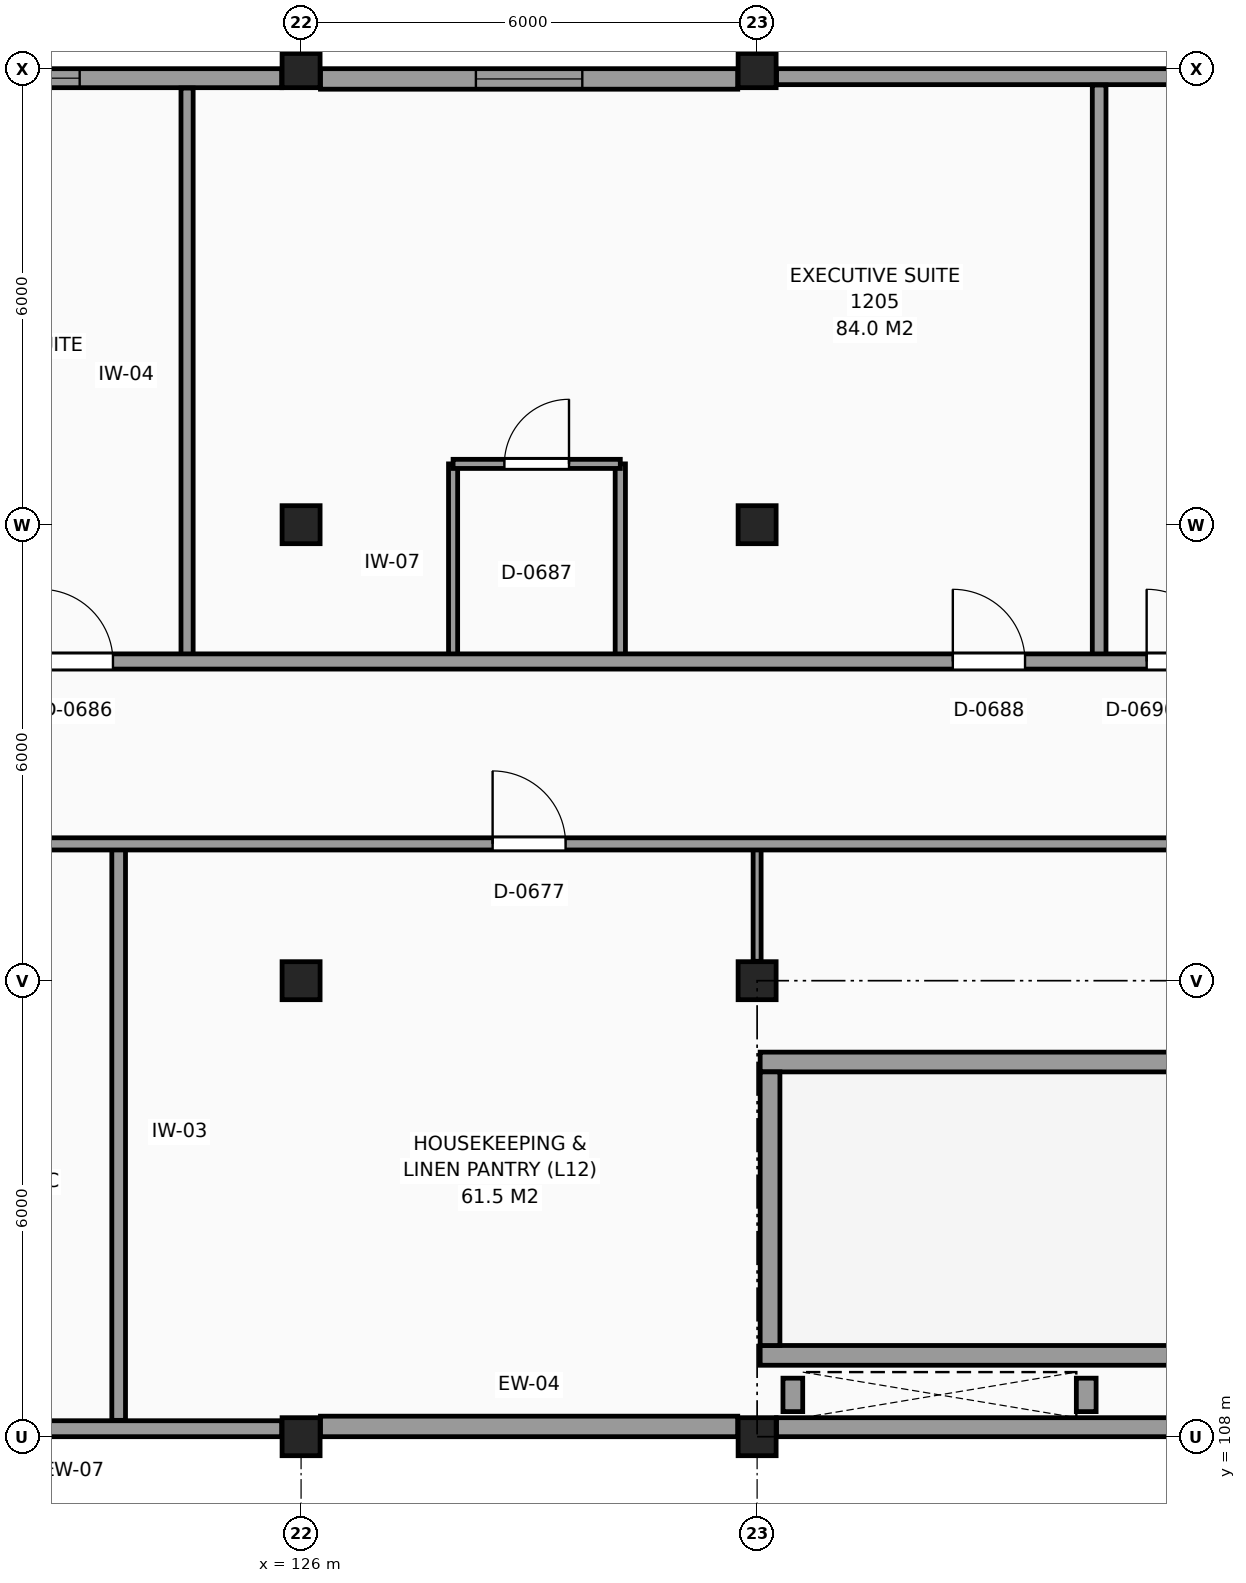
"""IFC4 building model, lengths in metres.
Left out: names, types, materials, properties, quantities, classifications, styles, units other than length and angle.
Written with IfcOpenShell. Run it as: python <this file> out.ifc"""

import sys

from ifc_helpers import new_model, si_unit, direction, frame, frame_2d, origin, origin_2d, place, context, subcontext, project, spatial, rectangle, extrude, element, fill, save


model = new_model("IFC4")
c1 = context("Model", 3, precision=1e-05, world=origin(), true_north=direction((0.0, 1.0)))
c2 = subcontext(c1, "Body", "Model", "MODEL_VIEW")
j1 = project(units=[si_unit("LENGTHUNIT", "METRE"), si_unit("PLANEANGLEUNIT", "RADIAN")], contexts=[c1])
p1 = place(None, origin())
s1 = spatial("IfcSite", under=j1, at=p1, CompositionType="ELEMENT")
p2 = place(p1, origin())
s2 = spatial("IfcBuilding", under=s1, at=p2, CompositionType="ELEMENT")
p3 = place(p2, frame((0.0, 0.0, 48.0)))
s3 = spatial("IfcBuildingStorey", under=s2, at=p3, CompositionType="ELEMENT", Elevation=48.0)
for number, where, z_axis, x_axis in (
    (1, (126.0, 108.0, 0.0), (0.0, 0.0, 1.0), (1.0, 0.0, 0.0)),
    (2, (126.0, 114.0, 0.0), (0.0, 0.0, 1.0), (1.0, 0.0, 0.0)),
    (3, (126.0, 120.0, 0.0), (0.0, 0.0, 1.0), (1.0, 0.0, 0.0)),
    (4, (126.0, 126.0, 0.0), (0.0, 0.0, 1.0), (1.0, 0.0, 0.0)),
    (5, (132.0, 108.0, 0.0), (0.0, 0.0, 1.0), (1.0, 0.0, 0.0)),
    (6, (132.0, 114.0, 0.0), (0.0, 0.0, 1.0), (1.0, 0.0, 0.0)),
    (7, (132.0, 120.0, 0.0), (0.0, 0.0, 1.0), (1.0, 0.0, 0.0)),
    (8, (132.0, 126.0, 0.0), (0.0, 0.0, 1.0), (1.0, 0.0, 0.0)),
):
    element("IfcColumn", number, at=place(p3, frame(where, z_axis=z_axis, x_axis=x_axis)), inside=s3, PredefinedType="COLUMN", context=c2, shape_type="SweptSolid", body=[
        extrude(rectangle(XDim=0.5, YDim=0.5, at=origin_2d()), origin(), (0.0, 0.0, 1.0), 3.3),
    ])
p4 = place(p3, frame((137.745, 125.895, 0.0), z_axis=(0.0, 0.0, 1.0), x_axis=(-1.0, 0.0, 0.0)))
e9 = element("IfcWall", 9, at=p4, inside=s3, PredefinedType="SOLIDWALL", context=c2, shape_type="SweptSolid", body=[
    extrude(rectangle(XDim=5.49, YDim=0.21, at=frame_2d((2.745, 0.0))), origin(), (0.0, 0.0, 1.0), 2.4),
])
p5 = place(p3, frame((131.745, 125.865, 0.0), z_axis=(0.0, 0.0, 1.0), x_axis=(-1.0, 0.0, 0.0)))
e10 = element("IfcWall", 10, at=p5, inside=s3, PredefinedType="SOLIDWALL", context=c2, shape_type="SweptSolid", body=[
    extrude(rectangle(XDim=5.49, YDim=0.27, at=frame_2d((2.745, 0.0))), origin(), (0.0, 0.0, 1.0), 2.4),
])
p6 = place(p5, frame((2.045, 0.0, 0.8)))
e11 = element("IfcOpeningElement", 11, at=p6, cuts=e10, PredefinedType="OPENING", context=c2, shape_type="SweptSolid", body=[
    extrude(rectangle(XDim=1.4, YDim=1.4, at=frame_2d((0.7, 0.7))), frame((0.0, 0.145, 0.0), z_axis=(0.0, -1.0, 0.0), x_axis=(1.0, 0.0, 0.0)), (0.0, 0.0, 1.0), 0.29),
])
p7 = place(p3, frame((125.745, 125.875, 0.0), z_axis=(0.0, 0.0, 1.0), x_axis=(-1.0, 0.0, 0.0)))
e12 = element("IfcWall", 12, at=p7, inside=s3, PredefinedType="SOLIDWALL", context=c2, shape_type="SweptSolid", body=[
    extrude(rectangle(XDim=5.49, YDim=0.25, at=frame_2d((2.745, 0.0))), origin(), (0.0, 0.0, 1.0), 2.4),
])
p8 = place(p7, frame((2.658, 0.0, 0.8)))
e13 = element("IfcOpeningElement", 13, at=p8, cuts=e12, PredefinedType="OPENING", context=c2, shape_type="SweptSolid", body=[
    extrude(rectangle(XDim=1.4, YDim=1.4, at=frame_2d((0.7, 0.7))), frame((0.0, 0.135, 0.0), z_axis=(0.0, -1.0, 0.0), x_axis=(1.0, 0.0, 0.0)), (0.0, 0.0, 1.0), 0.27),
])
p9 = place(p3, frame((120.255, 108.105, 0.0), z_axis=(0.0, 0.0, 1.0), x_axis=(1.0, 0.0, 0.0)))
e14 = element("IfcWall", 14, at=p9, inside=s3, PredefinedType="SOLIDWALL", context=c2, shape_type="SweptSolid", body=[
    extrude(rectangle(XDim=5.49, YDim=0.21, at=frame_2d((2.745, 0.0))), origin(), (0.0, 0.0, 1.0), 2.4),
])
p10 = place(p3, frame((126.255, 108.135, 0.0), z_axis=(0.0, 0.0, 1.0), x_axis=(1.0, 0.0, 0.0)))
e15 = element("IfcWall", 15, at=p10, inside=s3, PredefinedType="SOLIDWALL", context=c2, shape_type="SweptSolid", body=[
    extrude(rectangle(XDim=5.49, YDim=0.27, at=frame_2d((2.745, 0.0))), origin(), (0.0, 0.0, 1.0), 2.4),
])
p11 = place(p3, frame((132.255, 108.125, 0.0), z_axis=(0.0, 0.0, 1.0), x_axis=(1.0, 0.0, 0.0)))
e16 = element("IfcWall", 16, at=p11, inside=s3, PredefinedType="SOLIDWALL", context=c2, shape_type="SweptSolid", body=[
    extrude(rectangle(XDim=5.49, YDim=0.25, at=frame_2d((2.745, 0.0))), origin(), (0.0, 0.0, 1.0), 3.05),
])
for number, where, z_axis, x_axis in (
    (17, (132.04, 109.07, 0.0), (0.0, 0.0, 1.0), (1.0, 0.0, 0.0)),
    (18, (132.04, 112.93, 0.0), (0.0, 0.0, 1.0), (1.0, 0.0, 0.0)),
):
    element("IfcWall", number, at=place(p3, frame(where, z_axis=z_axis, x_axis=x_axis)), inside=s3, PredefinedType="SHEAR", context=c2, shape_type="SweptSolid", body=[
        extrude(rectangle(XDim=10.72, YDim=0.26, at=frame_2d((5.36, 0.0))), origin(), (0.0, 0.0, 1.0), 3.3),
    ])
p12 = place(p3, frame((132.17, 109.2, 0.0), z_axis=(0.0, 0.0, 1.0), x_axis=(0.0, 1.0, 0.0)))
e19 = element("IfcWall", 19, at=p12, inside=s3, PredefinedType="SHEAR", context=c2, shape_type="SweptSolid", body=[
    extrude(rectangle(XDim=3.6, YDim=0.26, at=frame_2d((1.8, 0.0))), origin(), (0.0, 0.0, 1.0), 3.3),
])
for number, where, z_axis, x_axis in (
    (20, (132.47, 108.33, 0.0), (0.0, 0.0, 1.0), (0.0, 1.0, 0.0)),
    (21, (136.33, 108.33, 0.0), (0.0, 0.0, 1.0), (0.0, 1.0, 0.0)),
):
    element("IfcWall", number, at=place(p3, frame(where, z_axis=z_axis, x_axis=x_axis)), inside=s3, PredefinedType="SHEAR", context=c2, shape_type="SweptSolid", body=[
        extrude(rectangle(XDim=0.44, YDim=0.26, at=frame_2d((0.22, 0.0))), origin(), (0.0, 0.0, 1.0), 3.3),
    ])
p13 = place(p3, frame((123.6, 108.215, 0.0), z_axis=(0.0, 0.0, 1.0), x_axis=(0.0, 1.0, 0.0)))
e22 = element("IfcWall", 22, at=p13, inside=s3, PredefinedType="PARTITIONING", context=c2, shape_type="SweptSolid", body=[
    extrude(rectangle(XDim=7.585, YDim=0.18, at=frame_2d((3.792, 0.0))), origin(), (0.0, 0.0, 1.0), 3.05),
])
p14 = place(p3, frame((124.5, 118.2, 0.0), z_axis=(0.0, 0.0, 1.0), x_axis=(0.0, 1.0, 0.0)))
e23 = element("IfcWall", 23, at=p14, inside=s3, PredefinedType="PARTITIONING", context=c2, shape_type="SweptSolid", body=[
    extrude(rectangle(XDim=7.545, YDim=0.16, at=frame_2d((3.772, 0.0))), origin(), (0.0, 0.0, 1.0), 3.05),
])
p15 = place(p3, frame((128.0, 118.2, 0.0), z_axis=(0.0, 0.0, 1.0), x_axis=(0.0, 1.0, 0.0)))
e24 = element("IfcWall", 24, at=p15, inside=s3, PredefinedType="PARTITIONING", context=c2, shape_type="SweptSolid", body=[
    extrude(rectangle(XDim=2.6, YDim=0.12, at=frame_2d((1.3, 0.0))), origin(), (0.0, 0.0, 1.0), 3.05),
])
p16 = place(p3, frame((130.2, 118.2, 0.0), z_axis=(0.0, 0.0, 1.0), x_axis=(0.0, 1.0, 0.0)))
e25 = element("IfcWall", 25, at=p16, inside=s3, PredefinedType="PARTITIONING", context=c2, shape_type="SweptSolid", body=[
    extrude(rectangle(XDim=2.6, YDim=0.135, at=frame_2d((1.3, 0.0))), origin(), (0.0, 0.0, 1.0), 3.05),
])
p17 = place(p3, frame((132.0, 114.255, 0.0), z_axis=(0.0, 0.0, 1.0), x_axis=(0.0, 1.0, 0.0)))
e26 = element("IfcWall", 26, at=p17, inside=s3, PredefinedType="PARTITIONING", context=c2, shape_type="SweptSolid", body=[
    extrude(rectangle(XDim=1.545, YDim=0.105, at=frame_2d((0.772, 0.0))), origin(), (0.0, 0.0, 1.0), 2.25),
])
p18 = place(p3, frame((136.5, 118.2, 0.0), z_axis=(0.0, 0.0, 1.0), x_axis=(0.0, 1.0, 0.0)))
e27 = element("IfcWall", 27, at=p18, inside=s3, PredefinedType="PARTITIONING", context=c2, shape_type="SweptSolid", body=[
    extrude(rectangle(XDim=7.585, YDim=0.18, at=frame_2d((3.792, 0.0))), origin(), (0.0, 0.0, 1.0), 3.05),
])
p19 = place(p3, frame((102.235, 115.8, 0.0), z_axis=(0.0, 0.0, 1.0), x_axis=(1.0, 0.0, 0.0)))
e28 = element("IfcWall", 28, at=p19, inside=s3, PredefinedType="PARTITIONING", context=c2, shape_type="SweptSolid", body=[
    extrude(rectangle(XDim=67.565, YDim=0.16, at=frame_2d((33.782, 0.0))), origin(), (0.0, 0.0, 1.0), 3.05),
])
p20 = place(p19, frame((44.165, 0.0, 0.0)))
e29 = element("IfcOpeningElement", 29, at=p20, cuts=e28, PredefinedType="OPENING", context=c2, shape_type="SweptSolid", body=[
    extrude(rectangle(XDim=1.2, YDim=2.2, at=frame_2d((0.6, 1.1))), frame((0.0, 0.09, 0.0), z_axis=(0.0, -1.0, 0.0), x_axis=(1.0, 0.0, 0.0)), (0.0, 0.0, 1.0), 0.18),
])
p21 = place(p19, frame((14.165, 0.0, 0.0)))
e30 = element("IfcOpeningElement", 30, at=p21, cuts=e28, PredefinedType="OPENING", context=c2, shape_type="SweptSolid", body=[
    extrude(rectangle(XDim=1.2, YDim=2.2, at=frame_2d((0.6, 1.1))), frame((0.0, 0.09, 0.0), z_axis=(0.0, -1.0, 0.0), x_axis=(1.0, 0.0, 0.0)), (0.0, 0.0, 1.0), 0.18),
])
p22 = place(p19, frame((19.315, 0.0, 0.0)))
e31 = element("IfcOpeningElement", 31, at=p22, cuts=e28, PredefinedType="OPENING", context=c2, shape_type="SweptSolid", body=[
    extrude(rectangle(XDim=1.0, YDim=2.15, at=frame_2d((0.5, 1.075))), frame((0.0, 0.09, 0.0), z_axis=(0.0, -1.0, 0.0), x_axis=(1.0, 0.0, 0.0)), (0.0, 0.0, 1.0), 0.18),
])
p23 = place(p19, frame((26.285, 0.0, 0.0)))
e32 = element("IfcOpeningElement", 32, at=p23, cuts=e28, PredefinedType="OPENING", context=c2, shape_type="SweptSolid", body=[
    extrude(rectangle(XDim=0.96, YDim=2.15, at=frame_2d((0.48, 1.075))), frame((0.0, 0.09, 0.0), z_axis=(0.0, -1.0, 0.0), x_axis=(1.0, 0.0, 0.0)), (0.0, 0.0, 1.0), 0.18),
])
p24 = place(p19, frame((49.965, 0.0, 0.0)))
e33 = element("IfcOpeningElement", 33, at=p24, cuts=e28, PredefinedType="OPENING", context=c2, shape_type="SweptSolid", body=[
    extrude(rectangle(XDim=1.6, YDim=2.25, at=frame_2d((0.8, 1.125))), frame((0.0, 0.09, 0.0), z_axis=(0.0, -1.0, 0.0), x_axis=(1.0, 0.0, 0.0)), (0.0, 0.0, 1.0), 0.18),
])
p25 = place(p3, frame((102.235, 118.2, 0.0), z_axis=(0.0, 0.0, 1.0), x_axis=(1.0, 0.0, 0.0)))
e34 = element("IfcWall", 34, at=p25, inside=s3, PredefinedType="PARTITIONING", context=c2, shape_type="SweptSolid", body=[
    extrude(rectangle(XDim=74.265, YDim=0.2, at=frame_2d((37.132, 0.0))), origin(), (0.0, 0.0, 1.0), 3.05),
])
p26 = place(p25, frame((0.49, 0.0, 0.0)))
e35 = element("IfcOpeningElement", 35, at=p26, cuts=e34, PredefinedType="OPENING", context=c2, shape_type="SweptSolid", body=[
    extrude(rectangle(XDim=0.95, YDim=2.1, at=frame_2d((0.475, 1.05))), frame((0.0, 0.11, 0.0), z_axis=(0.0, -1.0, 0.0), x_axis=(1.0, 0.0, 0.0)), (0.0, 0.0, 1.0), 0.22),
])
p27 = place(p25, frame((4.89, 0.0, 0.0)))
e36 = element("IfcOpeningElement", 36, at=p27, cuts=e34, PredefinedType="OPENING", context=c2, shape_type="SweptSolid", body=[
    extrude(rectangle(XDim=0.95, YDim=2.1, at=frame_2d((0.475, 1.05))), frame((0.0, 0.11, 0.0), z_axis=(0.0, -1.0, 0.0), x_axis=(1.0, 0.0, 0.0)), (0.0, 0.0, 1.0), 0.22),
])
p28 = place(p25, frame((12.09, 0.0, 0.0)))
e37 = element("IfcOpeningElement", 37, at=p28, cuts=e34, PredefinedType="OPENING", context=c2, shape_type="SweptSolid", body=[
    extrude(rectangle(XDim=0.95, YDim=2.1, at=frame_2d((0.475, 1.05))), frame((0.0, 0.11, 0.0), z_axis=(0.0, -1.0, 0.0), x_axis=(1.0, 0.0, 0.0)), (0.0, 0.0, 1.0), 0.22),
])
p29 = place(p25, frame((20.34, 0.0, 0.0)))
e38 = element("IfcOpeningElement", 38, at=p29, cuts=e34, PredefinedType="OPENING", context=c2, shape_type="SweptSolid", body=[
    extrude(rectangle(XDim=0.95, YDim=2.1, at=frame_2d((0.475, 1.05))), frame((0.0, 0.11, 0.0), z_axis=(0.0, -1.0, 0.0), x_axis=(1.0, 0.0, 0.0)), (0.0, 0.0, 1.0), 0.22),
])
p30 = place(p25, frame((32.34, 0.0, 0.0)))
e39 = element("IfcOpeningElement", 39, at=p30, cuts=e34, PredefinedType="OPENING", context=c2, shape_type="SweptSolid", body=[
    extrude(rectangle(XDim=0.95, YDim=2.1, at=frame_2d((0.475, 1.05))), frame((0.0, 0.11, 0.0), z_axis=(0.0, -1.0, 0.0), x_axis=(1.0, 0.0, 0.0)), (0.0, 0.0, 1.0), 0.22),
])
p31 = place(p25, frame((34.89, 0.0, 0.0)))
e40 = element("IfcOpeningElement", 40, at=p31, cuts=e34, PredefinedType="OPENING", context=c2, shape_type="SweptSolid", body=[
    extrude(rectangle(XDim=0.95, YDim=2.1, at=frame_2d((0.475, 1.05))), frame((0.0, 0.11, 0.0), z_axis=(0.0, -1.0, 0.0), x_axis=(1.0, 0.0, 0.0)), (0.0, 0.0, 1.0), 0.22),
])
p32 = place(p25, frame((42.09, 0.0, 0.0)))
e41 = element("IfcOpeningElement", 41, at=p32, cuts=e34, PredefinedType="OPENING", context=c2, shape_type="SweptSolid", body=[
    extrude(rectangle(XDim=0.95, YDim=2.1, at=frame_2d((0.475, 1.05))), frame((0.0, 0.11, 0.0), z_axis=(0.0, -1.0, 0.0), x_axis=(1.0, 0.0, 0.0)), (0.0, 0.0, 1.0), 0.22),
])
p33 = place(p25, frame((46.29, 0.0, 0.0)))
e42 = element("IfcOpeningElement", 42, at=p33, cuts=e34, PredefinedType="OPENING", context=c2, shape_type="SweptSolid", body=[
    extrude(rectangle(XDim=0.95, YDim=2.1, at=frame_2d((0.475, 1.05))), frame((0.0, 0.11, 0.0), z_axis=(0.0, -1.0, 0.0), x_axis=(1.0, 0.0, 0.0)), (0.0, 0.0, 1.0), 0.22),
])
p34 = place(p25, frame((55.59, 0.0, 0.0)))
e43 = element("IfcOpeningElement", 43, at=p34, cuts=e34, PredefinedType="OPENING", context=c2, shape_type="SweptSolid", body=[
    extrude(rectangle(XDim=0.95, YDim=2.1, at=frame_2d((0.475, 1.05))), frame((0.0, 0.11, 0.0), z_axis=(0.0, -1.0, 0.0), x_axis=(1.0, 0.0, 0.0)), (0.0, 0.0, 1.0), 0.22),
])
p35 = place(p25, frame((60.09, 0.0, 0.0)))
e44 = element("IfcOpeningElement", 44, at=p35, cuts=e34, PredefinedType="OPENING", context=c2, shape_type="SweptSolid", body=[
    extrude(rectangle(XDim=0.95, YDim=2.1, at=frame_2d((0.475, 1.05))), frame((0.0, 0.11, 0.0), z_axis=(0.0, -1.0, 0.0), x_axis=(1.0, 0.0, 0.0)), (0.0, 0.0, 1.0), 0.22),
])
p36 = place(p25, frame((64.29, 0.0, 0.0)))
e45 = element("IfcOpeningElement", 45, at=p36, cuts=e34, PredefinedType="OPENING", context=c2, shape_type="SweptSolid", body=[
    extrude(rectangle(XDim=0.95, YDim=2.1, at=frame_2d((0.475, 1.05))), frame((0.0, 0.11, 0.0), z_axis=(0.0, -1.0, 0.0), x_axis=(1.0, 0.0, 0.0)), (0.0, 0.0, 1.0), 0.22),
])
p37 = place(p25, frame((68.24, 0.0, 0.0)))
e46 = element("IfcOpeningElement", 46, at=p37, cuts=e34, PredefinedType="OPENING", context=c2, shape_type="SweptSolid", body=[
    extrude(rectangle(XDim=0.95, YDim=2.1, at=frame_2d((0.475, 1.05))), frame((0.0, 0.11, 0.0), z_axis=(0.0, -1.0, 0.0), x_axis=(1.0, 0.0, 0.0)), (0.0, 0.0, 1.0), 0.22),
])
p38 = place(p3, frame((128.0, 120.8, 0.0), z_axis=(0.0, 0.0, 1.0), x_axis=(1.0, 0.0, 0.0)))
e47 = element("IfcWall", 47, at=p38, inside=s3, PredefinedType="PARTITIONING", context=c2, shape_type="SweptSolid", body=[
    extrude(rectangle(XDim=2.2, YDim=0.12, at=frame_2d((1.1, 0.0))), origin(), (0.0, 0.0, 1.0), 3.05),
])
p39 = place(p38, frame((0.675, 0.0, 0.0)))
e48 = element("IfcOpeningElement", 48, at=p39, cuts=e47, PredefinedType="OPENING", context=c2, shape_type="SweptSolid", body=[
    extrude(rectangle(XDim=0.85, YDim=2.1, at=frame_2d((0.425, 1.05))), frame((0.0, 0.07, 0.0), z_axis=(0.0, -1.0, 0.0), x_axis=(1.0, 0.0, 0.0)), (0.0, 0.0, 1.0), 0.14),
])
p40 = place(p8, origin())
e49 = element("IfcWindow", 49, at=p40, inside=s3, PartitioningType="SINGLE_PANEL", PredefinedType="WINDOW", context=c2, shape_type="SweptSolid", body=[
    extrude(rectangle(XDim=1.4, YDim=1.4, at=frame_2d((0.7, 0.7))), frame((0.0, 0.03, 0.0), z_axis=(0.0, -1.0, 0.0), x_axis=(1.0, 0.0, 0.0)), (0.0, 0.0, 1.0), 0.06),
])
fill(e13, e49)
p41 = place(p6, origin())
e50 = element("IfcWindow", 50, at=p41, inside=s3, PartitioningType="SINGLE_PANEL", PredefinedType="WINDOW", context=c2, shape_type="SweptSolid", body=[
    extrude(rectangle(XDim=1.4, YDim=1.4, at=frame_2d((0.7, 0.7))), frame((0.0, 0.03, 0.0), z_axis=(0.0, -1.0, 0.0), x_axis=(1.0, 0.0, 0.0)), (0.0, 0.0, 1.0), 0.06),
])
fill(e11, e50)
p42 = place(p23, origin())
e51 = element("IfcDoor", 51, at=p42, inside=s3, OperationType="SINGLE_SWING_LEFT", PredefinedType="DOOR", context=c2, shape_type="SweptSolid", body=[
    extrude(rectangle(XDim=0.96, YDim=2.15, at=frame_2d((0.48, 1.075))), frame((0.0, 0.025, 0.0), z_axis=(0.0, -1.0, 0.0), x_axis=(1.0, 0.0, 0.0)), (0.0, 0.0, 1.0), 0.05),
])
fill(e32, e51)
p43 = place(p29, origin())
e52 = element("IfcDoor", 52, at=p43, inside=s3, OperationType="SINGLE_SWING_LEFT", PredefinedType="DOOR", context=c2, shape_type="SweptSolid", body=[
    extrude(rectangle(XDim=0.95, YDim=2.1, at=frame_2d((0.475, 1.05))), frame((0.0, 0.025, 0.0), z_axis=(0.0, -1.0, 0.0), x_axis=(1.0, 0.0, 0.0)), (0.0, 0.0, 1.0), 0.05),
])
fill(e38, e52)
p44 = place(p39, origin())
e53 = element("IfcDoor", 53, at=p44, inside=s3, OperationType="SINGLE_SWING_RIGHT", PredefinedType="DOOR", context=c2, shape_type="SweptSolid", body=[
    extrude(rectangle(XDim=0.85, YDim=2.1, at=frame_2d((0.425, 1.05))), frame((0.0, 0.025, 0.0), z_axis=(0.0, -1.0, 0.0), x_axis=(1.0, 0.0, 0.0)), (0.0, 0.0, 1.0), 0.05),
])
fill(e48, e53)
p45 = place(p30, origin())
e54 = element("IfcDoor", 54, at=p45, inside=s3, OperationType="SINGLE_SWING_LEFT", PredefinedType="DOOR", context=c2, shape_type="SweptSolid", body=[
    extrude(rectangle(XDim=0.95, YDim=2.1, at=frame_2d((0.475, 1.05))), frame((0.0, 0.025, 0.0), z_axis=(0.0, -1.0, 0.0), x_axis=(1.0, 0.0, 0.0)), (0.0, 0.0, 1.0), 0.05),
])
fill(e39, e54)
p46 = place(p31, origin())
e55 = element("IfcDoor", 55, at=p46, inside=s3, OperationType="SINGLE_SWING_LEFT", PredefinedType="DOOR", context=c2, shape_type="SweptSolid", body=[
    extrude(rectangle(XDim=0.95, YDim=2.1, at=frame_2d((0.475, 1.05))), frame((0.0, 0.025, 0.0), z_axis=(0.0, -1.0, 0.0), x_axis=(1.0, 0.0, 0.0)), (0.0, 0.0, 1.0), 0.05),
])
fill(e40, e55)
save(model, sys.argv[1])
